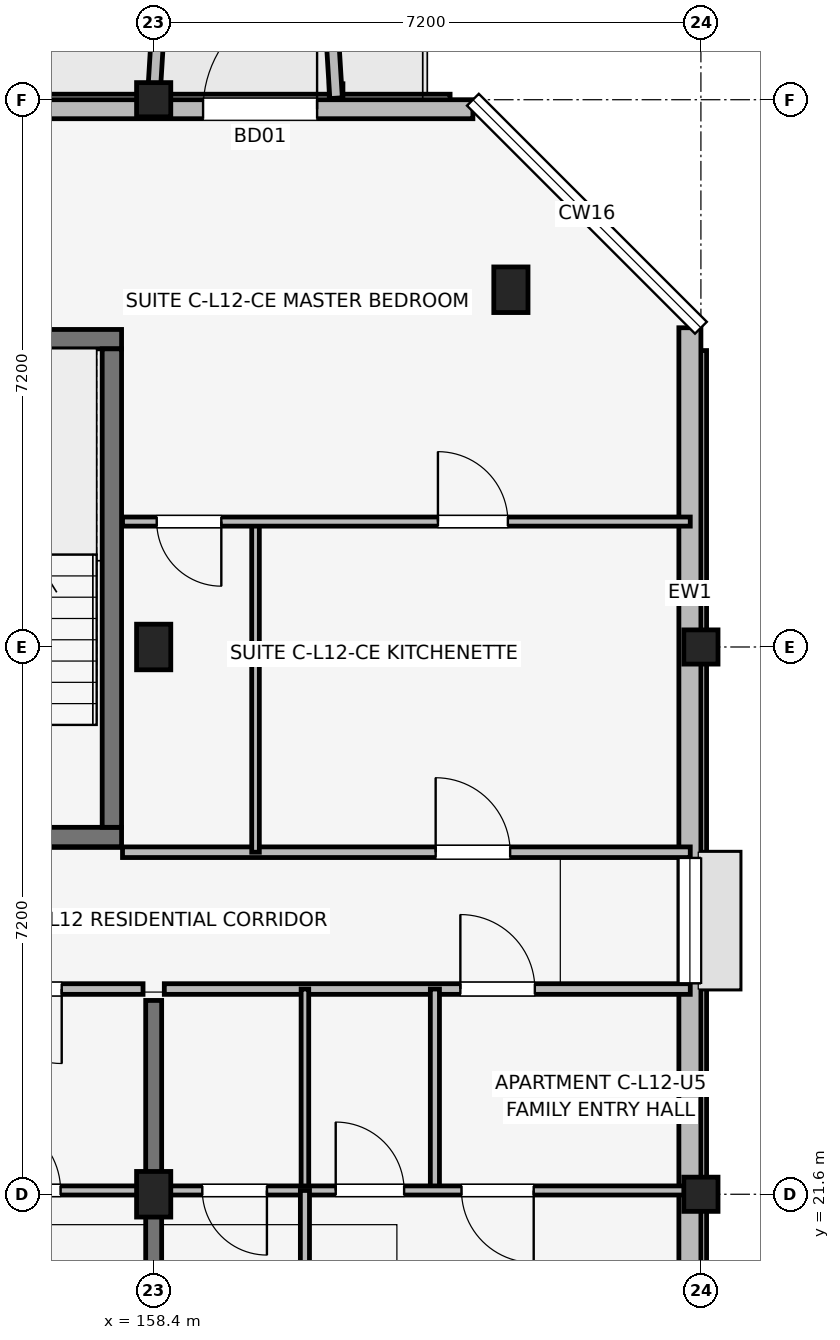
"""IFC4 building model, lengths in metres.
Left out: names, types, materials, properties, quantities, classifications, styles, units other than length and angle.
Written with IfcOpenShell. Run it as: python <this file> out.ifc"""

import sys

from ifc_helpers import new_model, si_unit, direction, frame, frame_2d, origin, origin_2d, place, context, subcontext, project, spatial, rectangle, extrude, element, fill, save


model = new_model("IFC4")
c1 = context("Model", 3, precision=1e-05, world=origin(), true_north=direction((0.0, 1.0)))
c2 = subcontext(c1, "Body", "Model", "MODEL_VIEW")
j1 = project(units=[si_unit("LENGTHUNIT", "METRE"), si_unit("PLANEANGLEUNIT", "RADIAN")], contexts=[c1])
p1 = place(None, origin())
s1 = spatial("IfcSite", under=j1, at=p1, CompositionType="ELEMENT")
p2 = place(p1, origin())
s2 = spatial("IfcBuilding", under=s1, at=p2, CompositionType="ELEMENT")
p3 = place(p2, frame((0.0, 0.0, 40.2)))
s3 = spatial("IfcBuildingStorey", under=s2, at=p3, CompositionType="ELEMENT", Elevation=40.2)
for number, where, z_axis, x_axis in (
    (1, (158.4, 21.6, 0.0), (0.0, 0.0, 1.0), (1.0, 0.0, 0.0)),
    (2, (158.4, 28.8, 0.0), (0.0, 0.0, 1.0), (1.0, 0.0, 0.0)),
):
    element("IfcColumn", number, at=place(p3, frame(where, z_axis=z_axis, x_axis=x_axis)), inside=s3, PredefinedType="COLUMN", context=c2, shape_type="SweptSolid", body=[
        extrude(rectangle(XDim=0.45, YDim=0.6, at=origin_2d()), origin(), (0.0, 0.0, 1.0), 3.15),
    ])
for number, where, z_axis, x_axis in (
    (3, (158.4, 36.0, 0.0), (0.0, 0.0, 1.0), (1.0, 0.0, 0.0)),
    (4, (165.6, 21.6, 0.0), (0.0, 0.0, 1.0), (1.0, 0.0, 0.0)),
    (5, (165.6, 28.8, 0.0), (0.0, 0.0, 1.0), (1.0, 0.0, 0.0)),
):
    element("IfcColumn", number, at=place(p3, frame(where, z_axis=z_axis, x_axis=x_axis)), inside=s3, PredefinedType="COLUMN", context=c2, shape_type="SweptSolid", body=[
        extrude(rectangle(XDim=0.45, YDim=0.45, at=origin_2d()), origin(), (0.0, 0.0, 1.0), 3.15),
    ])
p4 = place(p3, frame((163.1, 33.5, 0.0), z_axis=(0.0, 0.0, 1.0), x_axis=(1.0, 0.0, 0.0)))
e6 = element("IfcColumn", 6, at=p4, inside=s3, PredefinedType="COLUMN", context=c2, shape_type="SweptSolid", body=[
    extrude(rectangle(XDim=0.45, YDim=0.6, at=origin_2d()), origin(), (0.0, 0.0, 1.0), 3.15),
])
p5 = place(p3, frame((154.673, 26.3, 0.0), z_axis=(0.0, 0.0, 1.0), x_axis=(1.0, 0.0, 0.0)))
e7 = element("IfcWall", 7, at=p5, inside=s3, PredefinedType="SHEAR", context=c2, shape_type="SweptSolid", body=[
    extrude(rectangle(XDim=3.305, YDim=0.255, at=frame_2d((1.652, 0.0))), origin(), (0.0, 0.0, 1.0), 3.15),
])
p6 = place(p5, frame((1.127, 0.0, 0.0)))
e8 = element("IfcOpeningElement", 8, at=p6, cuts=e7, PredefinedType="OPENING", context=c2, shape_type="SweptSolid", body=[
    extrude(rectangle(XDim=1.05, YDim=2.12, at=frame_2d((0.525, 1.06))), frame((0.0, 0.137, 0.0), z_axis=(0.0, -1.0, 0.0), x_axis=(1.0, 0.0, 0.0)), (0.0, 0.0, 1.0), 0.275),
])
p7 = place(p3, frame((154.673, 32.85, 0.0), z_axis=(0.0, 0.0, 1.0), x_axis=(1.0, 0.0, 0.0)))
e9 = element("IfcWall", 9, at=p7, inside=s3, PredefinedType="SHEAR", context=c2, shape_type="SweptSolid", body=[
    extrude(rectangle(XDim=3.305, YDim=0.255, at=frame_2d((1.652, 0.0))), origin(), (0.0, 0.0, 1.0), 3.15),
])
p8 = place(p3, frame((157.85, 26.427, 0.0), z_axis=(0.0, 0.0, 1.0), x_axis=(0.0, 1.0, 0.0)))
e10 = element("IfcWall", 10, at=p8, inside=s3, PredefinedType="SHEAR", context=c2, shape_type="SweptSolid", body=[
    extrude(rectangle(XDim=6.295, YDim=0.255, at=frame_2d((3.147, 0.0))), origin(), (0.0, 0.0, 1.0), 3.15),
])
p9 = place(p3, frame((158.4, 14.75, 0.0), z_axis=(0.0, 0.0, 1.0), x_axis=(0.0, 1.0, 0.0)))
e11 = element("IfcWall", 11, at=p9, inside=s3, PredefinedType="SHEAR", context=c2, shape_type="SweptSolid", body=[
    extrude(rectangle(XDim=9.4, YDim=0.21, at=frame_2d((4.7, 0.0))), origin(), (0.0, 0.0, 1.0), 3.15),
])
p10 = place(p3, frame((165.455, 17.4, 0.0), z_axis=(0.0, 0.0, 1.0), x_axis=(0.0, 1.0, 0.0)))
e12 = element("IfcWall", 12, at=p10, inside=s3, PredefinedType="SOLIDWALL", context=c2, shape_type="SweptSolid", body=[
    extrude(rectangle(XDim=15.6, YDim=0.29, at=frame_2d((7.8, 0.0))), origin(), (0.0, 0.0, 1.0), 2.51),
])
p11 = place(p10, frame((6.975, 0.0, 1.05)))
e13 = element("IfcOpeningElement", 13, at=p11, cuts=e12, PredefinedType="OPENING", context=c2, shape_type="SweptSolid", body=[
    extrude(rectangle(XDim=1.65, YDim=1.15, at=frame_2d((0.825, 0.575))), frame((0.0, 0.155, 0.0), z_axis=(0.0, -1.0, 0.0), x_axis=(1.0, 0.0, 0.0)), (0.0, 0.0, 1.0), 0.31),
])
p12 = place(p10, frame((1.363, 0.0, 0.75)))
e14 = element("IfcOpeningElement", 14, at=p12, cuts=e12, PredefinedType="OPENING", context=c2, shape_type="SweptSolid", body=[
    extrude(rectangle(XDim=1.42, YDim=1.6, at=frame_2d((0.71, 0.8))), frame((0.0, 0.155, 0.0), z_axis=(0.0, -1.0, 0.0), x_axis=(1.0, 0.0, 0.0)), (0.0, 0.0, 1.0), 0.31),
])
p13 = place(p3, frame((162.6, 35.875, 0.0), z_axis=(0.0, 0.0, 1.0), x_axis=(-1.0, 0.0, 0.0)))
e15 = element("IfcWall", 15, at=p13, inside=s3, PredefinedType="SOLIDWALL", context=c2, shape_type="SweptSolid", body=[
    extrude(rectangle(XDim=30.0, YDim=0.25, at=frame_2d((15.0, 0.0))), origin(), (0.0, 0.0, 1.0), 2.48),
])
p14 = place(p13, frame((27.95, 0.0, 0.0), z_axis=(0.0, 0.0, 1.0), x_axis=(-1.0, 0.0, 0.0)))
e16 = element("IfcOpeningElement", 16, at=p14, cuts=e15, PredefinedType="OPENING", context=c2, shape_type="SweptSolid", body=[
    extrude(rectangle(XDim=1.5, YDim=2.15, at=frame_2d((0.75, 1.075))), frame((0.0, 0.135, 0.0), z_axis=(0.0, -1.0, 0.0), x_axis=(1.0, 0.0, 0.0)), (0.0, 0.0, 1.0), 0.27),
])
p15 = place(p13, frame((3.55, 0.0, 0.0), z_axis=(0.0, 0.0, 1.0), x_axis=(-1.0, 0.0, 0.0)))
e17 = element("IfcOpeningElement", 17, at=p15, cuts=e15, PredefinedType="OPENING", context=c2, shape_type="SweptSolid", body=[
    extrude(rectangle(XDim=1.5, YDim=2.15, at=frame_2d((0.75, 1.075))), frame((0.0, 0.135, 0.0), z_axis=(0.0, -1.0, 0.0), x_axis=(1.0, 0.0, 0.0)), (0.0, 0.0, 1.0), 0.27),
])
p16 = place(p13, frame((14.625, 0.0, 0.5)))
e18 = element("IfcOpeningElement", 18, at=p16, cuts=e15, PredefinedType="OPENING", context=c2, shape_type="SweptSolid", body=[
    extrude(rectangle(XDim=0.75, YDim=1.75, at=frame_2d((0.375, 0.875))), frame((0.0, 0.135, 0.0), z_axis=(0.0, -1.0, 0.0), x_axis=(1.0, 0.0, 0.0)), (0.0, 0.0, 1.0), 0.27),
])
p17 = place(p13, frame((9.278, 0.0, 0.7)))
e19 = element("IfcOpeningElement", 19, at=p17, cuts=e15, PredefinedType="OPENING", context=c2, shape_type="SweptSolid", body=[
    extrude(rectangle(XDim=1.58, YDim=1.6, at=frame_2d((0.79, 0.8))), frame((0.0, 0.135, 0.0), z_axis=(0.0, -1.0, 0.0), x_axis=(1.0, 0.0, 0.0)), (0.0, 0.0, 1.0), 0.27),
])
p18 = place(p13, frame((19.073, 0.0, 0.7)))
e20 = element("IfcOpeningElement", 20, at=p18, cuts=e15, PredefinedType="OPENING", context=c2, shape_type="SweptSolid", body=[
    extrude(rectangle(XDim=1.72, YDim=1.6, at=frame_2d((0.86, 0.8))), frame((0.0, 0.135, 0.0), z_axis=(0.0, -1.0, 0.0), x_axis=(1.0, 0.0, 0.0)), (0.0, 0.0, 1.0), 0.27),
])
p19 = place(p3, frame((158.4, 36.02, 0.0), z_axis=(0.0, 0.0, 1.0), x_axis=(0.061170732449, 0.998127317276, 0.0)))
e21 = element("IfcWall", 21, at=p19, inside=s3, PredefinedType="ELEMENTEDWALL", context=c2, shape_type="SweptSolid", body=[
    extrude(rectangle(XDim=1.964, YDim=0.165, at=frame_2d((0.982, 0.0))), origin(), (0.0, 0.0, 1.0), 2.48),
])
p20 = place(p3, frame((160.8, 36.02, 0.0), z_axis=(0.0, 0.0, 1.0), x_axis=(-0.061170732449, 0.998127317276, 0.0)))
e22 = element("IfcWall", 22, at=p20, inside=s3, PredefinedType="ELEMENTEDWALL", context=c2, shape_type="SweptSolid", body=[
    extrude(rectangle(XDim=1.964, YDim=0.165, at=frame_2d((0.982, 0.0))), origin(), (0.0, 0.0, 1.0), 2.8),
])
p21 = place(p3, frame((151.34, 24.3, 0.0), z_axis=(0.0, 0.0, 1.0), x_axis=(1.0, 0.0, 0.0)))
e23 = element("IfcWall", 23, at=p21, inside=s3, PredefinedType="PARTITIONING", context=c2, shape_type="SweptSolid", body=[
    extrude(rectangle(XDim=6.92, YDim=0.14, at=frame_2d((3.46, 0.0))), origin(), (0.0, 0.0, 1.0), 2.38),
])
p22 = place(p21, frame((5.85, 0.0, 0.0), z_axis=(0.0, 0.0, 1.0), x_axis=(-1.0, 0.0, 0.0)))
e24 = element("IfcOpeningElement", 24, at=p22, cuts=e23, PredefinedType="OPENING", context=c2, shape_type="SweptSolid", body=[
    extrude(rectangle(XDim=0.98, YDim=2.1, at=frame_2d((0.49, 1.05))), frame((0.0, 0.08, 0.0), z_axis=(0.0, -1.0, 0.0), x_axis=(1.0, 0.0, 0.0)), (0.0, 0.0, 1.0), 0.16),
])
p23 = place(p3, frame((151.34, 21.65, 0.0), z_axis=(0.0, 0.0, 1.0), x_axis=(1.0, 0.0, 0.0)))
e25 = element("IfcWall", 25, at=p23, inside=s3, PredefinedType="PARTITIONING", context=c2, shape_type="SweptSolid", body=[
    extrude(rectangle(XDim=6.92, YDim=0.12, at=frame_2d((3.46, 0.0))), origin(), (0.0, 0.0, 1.0), 2.38),
])
p24 = place(p23, frame((0.5, 0.0, 0.0)))
e26 = element("IfcOpeningElement", 26, at=p24, cuts=e25, PredefinedType="OPENING", context=c2, shape_type="SweptSolid", body=[
    extrude(rectangle(XDim=0.85, YDim=2.08, at=frame_2d((0.425, 1.04))), frame((0.0, 0.07, 0.0), z_axis=(0.0, -1.0, 0.0), x_axis=(1.0, 0.0, 0.0)), (0.0, 0.0, 1.0), 0.14),
])
p25 = place(p23, frame((3.275, 0.0, 0.0), z_axis=(0.0, 0.0, 1.0), x_axis=(-1.0, 0.0, 0.0)))
e27 = element("IfcOpeningElement", 27, at=p25, cuts=e25, PredefinedType="OPENING", context=c2, shape_type="SweptSolid", body=[
    extrude(rectangle(XDim=0.9, YDim=2.08, at=frame_2d((0.45, 1.04))), frame((0.0, 0.07, 0.0), z_axis=(0.0, -1.0, 0.0), x_axis=(1.0, 0.0, 0.0)), (0.0, 0.0, 1.0), 0.14),
])
p26 = place(p23, frame((4.885, 0.0, 0.0)))
e28 = element("IfcOpeningElement", 28, at=p26, cuts=e25, PredefinedType="OPENING", context=c2, shape_type="SweptSolid", body=[
    extrude(rectangle(XDim=0.95, YDim=2.08, at=frame_2d((0.475, 1.04))), frame((0.0, 0.07, 0.0), z_axis=(0.0, -1.0, 0.0), x_axis=(1.0, 0.0, 0.0)), (0.0, 0.0, 1.0), 0.14),
])
p27 = place(p3, frame((158.54, 24.3, 0.0), z_axis=(0.0, 0.0, 1.0), x_axis=(1.0, 0.0, 0.0)))
e29 = element("IfcWall", 29, at=p27, inside=s3, PredefinedType="PARTITIONING", context=c2, shape_type="SweptSolid", body=[
    extrude(rectangle(XDim=6.92, YDim=0.14, at=frame_2d((3.46, 0.0))), origin(), (0.0, 0.0, 1.0), 2.38),
])
p28 = place(p27, frame((3.895, 0.0, 0.0)))
e30 = element("IfcOpeningElement", 30, at=p28, cuts=e29, PredefinedType="OPENING", context=c2, shape_type="SweptSolid", body=[
    extrude(rectangle(XDim=0.98, YDim=2.1, at=frame_2d((0.49, 1.05))), frame((0.0, 0.08, 0.0), z_axis=(0.0, -1.0, 0.0), x_axis=(1.0, 0.0, 0.0)), (0.0, 0.0, 1.0), 0.16),
])
p29 = place(p3, frame((160.39, 21.65, 0.0), z_axis=(0.0, 0.0, 1.0), x_axis=(0.0, 1.0, 0.0)))
e31 = element("IfcWall", 31, at=p29, inside=s3, PredefinedType="PARTITIONING", context=c2, shape_type="SweptSolid", body=[
    extrude(rectangle(XDim=2.65, YDim=0.1, at=frame_2d((1.325, 0.0))), origin(), (0.0, 0.0, 1.0), 2.38),
])
p30 = place(p3, frame((162.1, 21.65, 0.0), z_axis=(0.0, 0.0, 1.0), x_axis=(0.0, 1.0, 0.0)))
e32 = element("IfcWall", 32, at=p30, inside=s3, PredefinedType="PARTITIONING", context=c2, shape_type="SweptSolid", body=[
    extrude(rectangle(XDim=2.65, YDim=0.12, at=frame_2d((1.325, 0.0))), origin(), (0.0, 0.0, 1.0), 2.38),
])
p31 = place(p3, frame((158.54, 21.65, 0.0), z_axis=(0.0, 0.0, 1.0), x_axis=(1.0, 0.0, 0.0)))
e33 = element("IfcWall", 33, at=p31, inside=s3, PredefinedType="PARTITIONING", context=c2, shape_type="SweptSolid", body=[
    extrude(rectangle(XDim=6.92, YDim=0.12, at=frame_2d((3.46, 0.0))), origin(), (0.0, 0.0, 1.0), 2.38),
])
p32 = place(p31, frame((1.35, 0.0, 0.0), z_axis=(0.0, 0.0, 1.0), x_axis=(-1.0, 0.0, 0.0)))
e34 = element("IfcOpeningElement", 34, at=p32, cuts=e33, PredefinedType="OPENING", context=c2, shape_type="SweptSolid", body=[
    extrude(rectangle(XDim=0.85, YDim=2.08, at=frame_2d((0.425, 1.04))), frame((0.0, 0.07, 0.0), z_axis=(0.0, -1.0, 0.0), x_axis=(1.0, 0.0, 0.0)), (0.0, 0.0, 1.0), 0.14),
])
p33 = place(p31, frame((2.255, 0.0, 0.0)))
e35 = element("IfcOpeningElement", 35, at=p33, cuts=e33, PredefinedType="OPENING", context=c2, shape_type="SweptSolid", body=[
    extrude(rectangle(XDim=0.9, YDim=2.08, at=frame_2d((0.45, 1.04))), frame((0.0, 0.07, 0.0), z_axis=(0.0, -1.0, 0.0), x_axis=(1.0, 0.0, 0.0)), (0.0, 0.0, 1.0), 0.14),
])
p34 = place(p31, frame((4.86, 0.0, 0.0), z_axis=(0.0, 0.0, 1.0), x_axis=(-1.0, 0.0, 0.0)))
e36 = element("IfcOpeningElement", 36, at=p34, cuts=e33, PredefinedType="OPENING", context=c2, shape_type="SweptSolid", body=[
    extrude(rectangle(XDim=0.95, YDim=2.08, at=frame_2d((0.475, 1.04))), frame((0.0, 0.07, 0.0), z_axis=(0.0, -1.0, 0.0), x_axis=(1.0, 0.0, 0.0)), (0.0, 0.0, 1.0), 0.14),
])
p35 = place(p3, frame((160.39, 14.7, 0.0), z_axis=(0.0, 0.0, 1.0), x_axis=(0.0, 1.0, 0.0)))
e37 = element("IfcWall", 37, at=p35, inside=s3, PredefinedType="PARTITIONING", context=c2, shape_type="SweptSolid", body=[
    extrude(rectangle(XDim=6.95, YDim=0.12, at=frame_2d((3.475, 0.0))), origin(), (0.0, 0.0, 1.0), 2.38),
])
p36 = place(p35, frame((3.025, 0.0, 0.0)))
e38 = element("IfcOpeningElement", 38, at=p36, cuts=e37, PredefinedType="OPENING", context=c2, shape_type="SweptSolid", body=[
    extrude(rectangle(XDim=0.9, YDim=2.08, at=frame_2d((0.45, 1.04))), frame((0.0, 0.07, 0.0), z_axis=(0.0, -1.0, 0.0), x_axis=(1.0, 0.0, 0.0)), (0.0, 0.0, 1.0), 0.14),
])
p37 = place(p3, frame((157.99, 26.1, 0.0), z_axis=(0.0, 0.0, 1.0), x_axis=(1.0, 0.0, 0.0)))
e39 = element("IfcWall", 39, at=p37, inside=s3, PredefinedType="PARTITIONING", context=c2, shape_type="SweptSolid", body=[
    extrude(rectangle(XDim=7.47, YDim=0.14, at=frame_2d((3.735, 0.0))), origin(), (0.0, 0.0, 1.0), 2.38),
])
p38 = place(p37, frame((4.12, 0.0, 0.0)))
e40 = element("IfcOpeningElement", 40, at=p38, cuts=e39, PredefinedType="OPENING", context=c2, shape_type="SweptSolid", body=[
    extrude(rectangle(XDim=0.98, YDim=2.1, at=frame_2d((0.49, 1.05))), frame((0.0, 0.08, 0.0), z_axis=(0.0, -1.0, 0.0), x_axis=(1.0, 0.0, 0.0)), (0.0, 0.0, 1.0), 0.16),
])
p39 = place(p3, frame((159.74, 26.1, 0.0), z_axis=(0.0, 0.0, 1.0), x_axis=(0.0, 1.0, 0.0)))
e41 = element("IfcWall", 41, at=p39, inside=s3, PredefinedType="PARTITIONING", context=c2, shape_type="SweptSolid", body=[
    extrude(rectangle(XDim=4.35, YDim=0.1, at=frame_2d((2.175, 0.0))), origin(), (0.0, 0.0, 1.0), 2.38),
])
p40 = place(p3, frame((157.99, 30.45, 0.0), z_axis=(0.0, 0.0, 1.0), x_axis=(1.0, 0.0, 0.0)))
e42 = element("IfcWall", 42, at=p40, inside=s3, PredefinedType="PARTITIONING", context=c2, shape_type="SweptSolid", body=[
    extrude(rectangle(XDim=7.47, YDim=0.12, at=frame_2d((3.735, 0.0))), origin(), (0.0, 0.0, 1.0), 2.38),
])
p41 = place(p40, frame((1.3, 0.0, 0.0), z_axis=(0.0, 0.0, 1.0), x_axis=(-1.0, 0.0, 0.0)))
e43 = element("IfcOpeningElement", 43, at=p41, cuts=e42, PredefinedType="OPENING", context=c2, shape_type="SweptSolid", body=[
    extrude(rectangle(XDim=0.85, YDim=2.08, at=frame_2d((0.425, 1.04))), frame((0.0, 0.07, 0.0), z_axis=(0.0, -1.0, 0.0), x_axis=(1.0, 0.0, 0.0)), (0.0, 0.0, 1.0), 0.14),
])
p42 = place(p40, frame((4.15, 0.0, 0.0)))
e44 = element("IfcOpeningElement", 44, at=p42, cuts=e42, PredefinedType="OPENING", context=c2, shape_type="SweptSolid", body=[
    extrude(rectangle(XDim=0.92, YDim=2.08, at=frame_2d((0.46, 1.04))), frame((0.0, 0.07, 0.0), z_axis=(0.0, -1.0, 0.0), x_axis=(1.0, 0.0, 0.0)), (0.0, 0.0, 1.0), 0.14),
])
p43 = place(p15, origin())
e45 = element("IfcDoor", 45, at=p43, inside=s3, OperationType="SINGLE_SWING_LEFT", PredefinedType="DOOR", context=c2, shape_type="SweptSolid", body=[
    extrude(rectangle(XDim=1.5, YDim=2.15, at=frame_2d((0.75, 1.075))), frame((0.0, 0.025, 0.0), z_axis=(0.0, -1.0, 0.0), x_axis=(1.0, 0.0, 0.0)), (0.0, 0.0, 1.0), 0.05),
])
fill(e17, e45)
p44 = place(p11, origin())
e46 = element("IfcWindow", 46, at=p44, inside=s3, PartitioningType="SINGLE_PANEL", PredefinedType="WINDOW", context=c2, shape_type="SweptSolid", body=[
    extrude(rectangle(XDim=1.65, YDim=1.15, at=frame_2d((0.825, 0.575))), frame((0.0, 0.03, 0.0), z_axis=(0.0, -1.0, 0.0), x_axis=(1.0, 0.0, 0.0)), (0.0, 0.0, 1.0), 0.06),
])
fill(e13, e46)
p45 = place(p22, origin())
e47 = element("IfcDoor", 47, at=p45, inside=s3, OperationType="SINGLE_SWING_RIGHT", PredefinedType="DOOR", context=c2, shape_type="SweptSolid", body=[
    extrude(rectangle(XDim=0.98, YDim=2.1, at=frame_2d((0.49, 1.05))), frame((0.0, 0.025, 0.0), z_axis=(0.0, -1.0, 0.0), x_axis=(1.0, 0.0, 0.0)), (0.0, 0.0, 1.0), 0.05),
])
fill(e24, e47)
p46 = place(p26, origin())
e48 = element("IfcDoor", 48, at=p46, inside=s3, OperationType="SINGLE_SWING_LEFT", PredefinedType="DOOR", context=c2, shape_type="SweptSolid", body=[
    extrude(rectangle(XDim=0.95, YDim=2.08, at=frame_2d((0.475, 1.04))), frame((0.0, 0.025, 0.0), z_axis=(0.0, -1.0, 0.0), x_axis=(1.0, 0.0, 0.0)), (0.0, 0.0, 1.0), 0.05),
])
fill(e28, e48)
p47 = place(p28, origin())
e49 = element("IfcDoor", 49, at=p47, inside=s3, OperationType="SINGLE_SWING_LEFT", PredefinedType="DOOR", context=c2, shape_type="SweptSolid", body=[
    extrude(rectangle(XDim=0.98, YDim=2.1, at=frame_2d((0.49, 1.05))), frame((0.0, 0.025, 0.0), z_axis=(0.0, -1.0, 0.0), x_axis=(1.0, 0.0, 0.0)), (0.0, 0.0, 1.0), 0.05),
])
fill(e30, e49)
p48 = place(p32, origin())
e50 = element("IfcDoor", 50, at=p48, inside=s3, OperationType="SINGLE_SWING_RIGHT", PredefinedType="DOOR", context=c2, shape_type="SweptSolid", body=[
    extrude(rectangle(XDim=0.85, YDim=2.08, at=frame_2d((0.425, 1.04))), frame((0.0, 0.025, 0.0), z_axis=(0.0, -1.0, 0.0), x_axis=(1.0, 0.0, 0.0)), (0.0, 0.0, 1.0), 0.05),
])
fill(e34, e50)
p49 = place(p33, origin())
e51 = element("IfcDoor", 51, at=p49, inside=s3, OperationType="SINGLE_SWING_LEFT", PredefinedType="DOOR", context=c2, shape_type="SweptSolid", body=[
    extrude(rectangle(XDim=0.9, YDim=2.08, at=frame_2d((0.45, 1.04))), frame((0.0, 0.025, 0.0), z_axis=(0.0, -1.0, 0.0), x_axis=(1.0, 0.0, 0.0)), (0.0, 0.0, 1.0), 0.05),
])
fill(e35, e51)
p50 = place(p34, origin())
e52 = element("IfcDoor", 52, at=p50, inside=s3, OperationType="SINGLE_SWING_RIGHT", PredefinedType="DOOR", context=c2, shape_type="SweptSolid", body=[
    extrude(rectangle(XDim=0.95, YDim=2.08, at=frame_2d((0.475, 1.04))), frame((0.0, 0.025, 0.0), z_axis=(0.0, -1.0, 0.0), x_axis=(1.0, 0.0, 0.0)), (0.0, 0.0, 1.0), 0.05),
])
fill(e36, e52)
p51 = place(p38, origin())
e53 = element("IfcDoor", 53, at=p51, inside=s3, OperationType="SINGLE_SWING_LEFT", PredefinedType="DOOR", context=c2, shape_type="SweptSolid", body=[
    extrude(rectangle(XDim=0.98, YDim=2.1, at=frame_2d((0.49, 1.05))), frame((0.0, 0.025, 0.0), z_axis=(0.0, -1.0, 0.0), x_axis=(1.0, 0.0, 0.0)), (0.0, 0.0, 1.0), 0.05),
])
fill(e40, e53)
p52 = place(p41, origin())
e54 = element("IfcDoor", 54, at=p52, inside=s3, OperationType="SINGLE_SWING_RIGHT", PredefinedType="DOOR", context=c2, shape_type="SweptSolid", body=[
    extrude(rectangle(XDim=0.85, YDim=2.08, at=frame_2d((0.425, 1.04))), frame((0.0, 0.025, 0.0), z_axis=(0.0, -1.0, 0.0), x_axis=(1.0, 0.0, 0.0)), (0.0, 0.0, 1.0), 0.05),
])
fill(e43, e54)
p53 = place(p42, origin())
e55 = element("IfcDoor", 55, at=p53, inside=s3, OperationType="SINGLE_SWING_LEFT", PredefinedType="DOOR", context=c2, shape_type="SweptSolid", body=[
    extrude(rectangle(XDim=0.92, YDim=2.08, at=frame_2d((0.46, 1.04))), frame((0.0, 0.025, 0.0), z_axis=(0.0, -1.0, 0.0), x_axis=(1.0, 0.0, 0.0)), (0.0, 0.0, 1.0), 0.05),
])
fill(e44, e55)
save(model, sys.argv[1])
